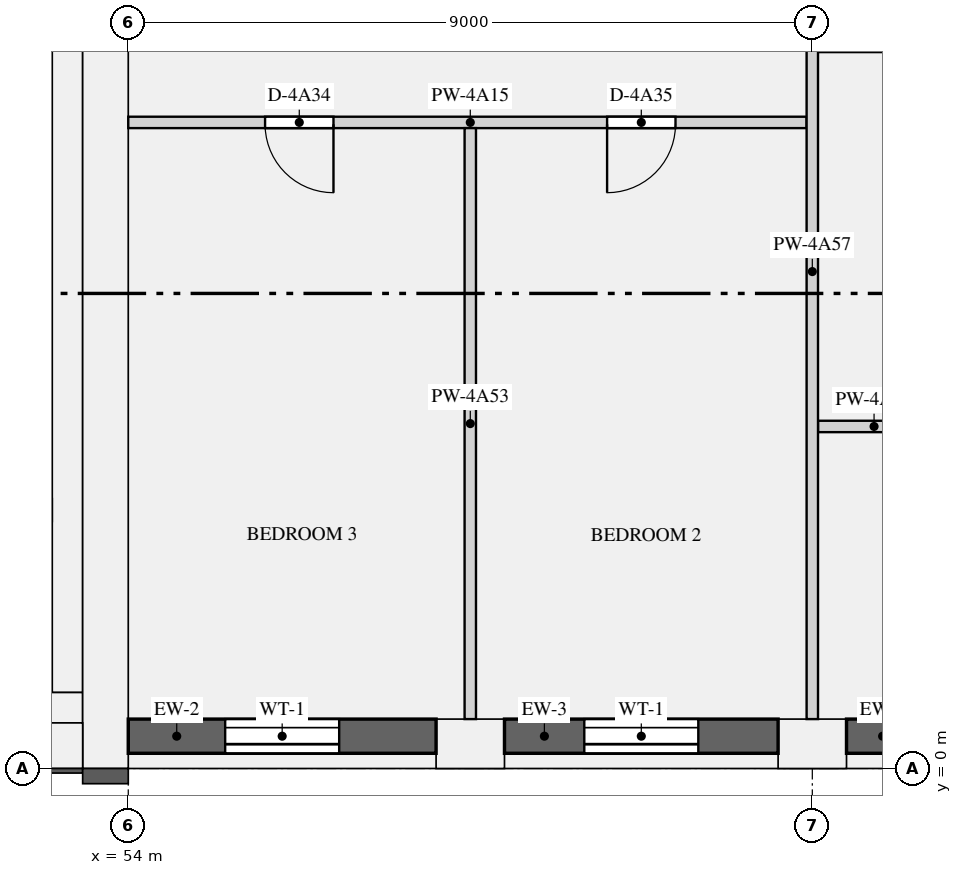
"""IFC4 building model, lengths in metres.
Left out: names, types, materials, properties, quantities, classifications, styles, units other than length and angle.
Written with IfcOpenShell. Run it as: python <this file> out.ifc"""

import sys

from ifc_helpers import new_model, si_unit, direction, frame, frame_2d, origin, origin_2d, place, context, subcontext, project, spatial, rectangle, extrude, element, fill, save


model = new_model("IFC4")
c1 = context("Model", 3, precision=1e-05, world=origin(), true_north=direction((0.0, 1.0)))
c2 = subcontext(c1, "Body", "Model", "MODEL_VIEW")
j1 = project(units=[si_unit("LENGTHUNIT", "METRE"), si_unit("PLANEANGLEUNIT", "RADIAN")], contexts=[c1])
p1 = place(None, origin())
s1 = spatial("IfcSite", under=j1, at=p1, CompositionType="ELEMENT")
p2 = place(p1, origin())
s2 = spatial("IfcBuilding", under=s1, at=p2, CompositionType="ELEMENT")
p3 = place(p2, frame((0.0, 0.0, 198.0)))
s3 = spatial("IfcBuildingStorey", under=s2, at=p3, CompositionType="ELEMENT", Elevation=198.0)
for number, where, z_axis, x_axis in (
    (1, (58.5, 0.325, 0.0), (0.0, 0.0, 1.0), (1.0, 0.0, 0.0)),
    (2, (63.0, 0.325, 0.0), (0.0, 0.0, 1.0), (1.0, 0.0, 0.0)),
):
    element("IfcColumn", number, at=place(p3, frame(where, z_axis=z_axis, x_axis=x_axis)), inside=s3, PredefinedType="USERDEFINED", context=c2, shape_type="SweptSolid", body=[
        extrude(rectangle(XDim=0.9, YDim=0.65, at=origin_2d()), origin(), (0.0, 0.0, 1.0), 3.15),
    ])
p4 = place(p3, frame((53.7, 0.0, 0.0), z_axis=(0.0, 0.0, 1.0), x_axis=(0.0, 1.0, 0.0)))
e3 = element("IfcWall", 3, at=p4, inside=s3, PredefinedType="SHEAR", context=c2, shape_type="SweptSolid", body=[
    extrude(rectangle(XDim=12.5, YDim=0.6, at=frame_2d((6.25, 0.0))), origin(), (0.0, 0.0, 1.0), 3.15),
])
p5 = place(p3, frame((18.6, 0.3, 0.0), z_axis=(0.0, 0.0, 1.0), x_axis=(1.0, 0.0, 0.0)))
e4 = element("IfcWall", 4, at=p5, inside=s3, PredefinedType="SHEAR", context=c2, shape_type="SweptSolid", body=[
    extrude(rectangle(XDim=34.8, YDim=0.6, at=frame_2d((17.4, 0.0))), origin(), (0.0, 0.0, 1.0), 3.15),
])
p6 = place(p3, frame((53.2, 1.0, 0.0), z_axis=(0.0, 0.0, 1.0), x_axis=(0.0, 1.0, 0.0)))
e5 = element("IfcWall", 5, at=p6, inside=s3, PredefinedType="SHEAR", context=c2, shape_type="SweptSolid", body=[
    extrude(rectangle(XDim=10.9, YDim=0.4, at=frame_2d((5.45, 0.0))), origin(), (0.0, 0.0, 1.0), 3.15),
])
p7 = place(p3, frame((18.6, 0.8, 0.0), z_axis=(0.0, 0.0, 1.0), x_axis=(1.0, 0.0, 0.0)))
e6 = element("IfcWall", 6, at=p7, inside=s3, PredefinedType="SHEAR", context=c2, shape_type="SweptSolid", body=[
    extrude(rectangle(XDim=34.8, YDim=0.4, at=frame_2d((17.4, 0.0))), origin(), (0.0, 0.0, 1.0), 3.15),
])
p8 = place(p3, frame((54.0, 0.425, 0.9), z_axis=(0.0, 0.0, 1.0), x_axis=(1.0, 0.0, 0.0)))
e7 = element("IfcWall", 7, at=p8, inside=s3, PredefinedType="SOLIDWALL", context=c2, shape_type="SweptSolid", body=[
    extrude(rectangle(XDim=4.05, YDim=0.45, at=frame_2d((2.025, 0.0))), origin(), (0.0, 0.0, 1.0), 1.93),
])
p9 = place(p8, frame((1.275, 0.0, 0.15)))
e8 = element("IfcOpeningElement", 8, at=p9, cuts=e7, PredefinedType="OPENING", context=c2, shape_type="SweptSolid", body=[
    extrude(rectangle(XDim=1.5, YDim=1.5, at=frame_2d((0.75, 0.75))), frame((0.0, 0.235, 0.0), z_axis=(0.0, -1.0, 0.0), x_axis=(1.0, 0.0, 0.0)), (0.0, 0.0, 1.0), 0.47),
])
p10 = place(p3, frame((58.95, 0.425, 0.9), z_axis=(0.0, 0.0, 1.0), x_axis=(1.0, 0.0, 0.0)))
e9 = element("IfcWall", 9, at=p10, inside=s3, PredefinedType="SOLIDWALL", context=c2, shape_type="SweptSolid", body=[
    extrude(rectangle(XDim=3.6, YDim=0.45, at=frame_2d((1.8, 0.0))), origin(), (0.0, 0.0, 1.0), 1.93),
])
p11 = place(p10, frame((1.05, 0.0, 0.15)))
e10 = element("IfcOpeningElement", 10, at=p11, cuts=e9, PredefinedType="OPENING", context=c2, shape_type="SweptSolid", body=[
    extrude(rectangle(XDim=1.5, YDim=1.5, at=frame_2d((0.75, 0.75))), frame((0.0, 0.235, 0.0), z_axis=(0.0, -1.0, 0.0), x_axis=(1.0, 0.0, 0.0)), (0.0, 0.0, 1.0), 0.47),
])
p12 = place(p3, frame((63.45, 0.425, 0.9), z_axis=(0.0, 0.0, 1.0), x_axis=(1.0, 0.0, 0.0)))
e11 = element("IfcWall", 11, at=p12, inside=s3, PredefinedType="SOLIDWALL", context=c2, shape_type="SweptSolid", body=[
    extrude(rectangle(XDim=3.4, YDim=0.45, at=frame_2d((1.7, 0.0))), origin(), (0.0, 0.0, 1.0), 1.93),
])
p13 = place(p12, frame((0.95, 0.0, 0.15)))
e12 = element("IfcOpeningElement", 12, at=p13, cuts=e11, PredefinedType="OPENING", context=c2, shape_type="SweptSolid", body=[
    extrude(rectangle(XDim=1.5, YDim=1.5, at=frame_2d((0.75, 0.75))), frame((0.0, 0.235, 0.0), z_axis=(0.0, -1.0, 0.0), x_axis=(1.0, 0.0, 0.0)), (0.0, 0.0, 1.0), 0.47),
])
p14 = place(p3, frame((54.0, 8.5, 0.0), z_axis=(0.0, 0.0, 1.0), x_axis=(1.0, 0.0, 0.0)))
e13 = element("IfcWall", 13, at=p14, inside=s3, PredefinedType="PARTITIONING", context=c2, shape_type="SweptSolid", body=[
    extrude(rectangle(XDim=8.925, YDim=0.15, at=frame_2d((4.462, 0.0))), origin(), (0.0, 0.0, 1.0), 2.83),
])
p15 = place(p14, frame((1.8, 0.0, 0.0)))
e14 = element("IfcOpeningElement", 14, at=p15, cuts=e13, PredefinedType="OPENING", context=c2, shape_type="SweptSolid", body=[
    extrude(rectangle(XDim=0.9, YDim=2.1, at=frame_2d((0.45, 1.05))), frame((0.0, 0.085, 0.0), z_axis=(0.0, -1.0, 0.0), x_axis=(1.0, 0.0, 0.0)), (0.0, 0.0, 1.0), 0.17),
])
p16 = place(p14, frame((6.3, 0.0, 0.0)))
e15 = element("IfcOpeningElement", 15, at=p16, cuts=e13, PredefinedType="OPENING", context=c2, shape_type="SweptSolid", body=[
    extrude(rectangle(XDim=0.9, YDim=2.1, at=frame_2d((0.45, 1.05))), frame((0.0, 0.085, 0.0), z_axis=(0.0, -1.0, 0.0), x_axis=(1.0, 0.0, 0.0)), (0.0, 0.0, 1.0), 0.17),
])
p17 = place(p3, frame((63.075, 4.5, 0.0), z_axis=(0.0, 0.0, 1.0), x_axis=(1.0, 0.0, 0.0)))
e16 = element("IfcWall", 16, at=p17, inside=s3, PredefinedType="PARTITIONING", context=c2, shape_type="SweptSolid", body=[
    extrude(rectangle(XDim=3.775, YDim=0.15, at=frame_2d((1.888, 0.0))), origin(), (0.0, 0.0, 1.0), 2.83),
])
p18 = place(p17, frame((1.475, 0.0, 0.0)))
e17 = element("IfcOpeningElement", 17, at=p18, cuts=e16, PredefinedType="OPENING", context=c2, shape_type="SweptSolid", body=[
    extrude(rectangle(XDim=0.9, YDim=2.1, at=frame_2d((0.45, 1.05))), frame((0.0, 0.085, 0.0), z_axis=(0.0, -1.0, 0.0), x_axis=(1.0, 0.0, 0.0)), (0.0, 0.0, 1.0), 0.17),
])
p19 = place(p3, frame((58.5, 0.65, 0.0), z_axis=(0.0, 0.0, 1.0), x_axis=(0.0, 1.0, 0.0)))
e18 = element("IfcWall", 18, at=p19, inside=s3, PredefinedType="PARTITIONING", context=c2, shape_type="SweptSolid", body=[
    extrude(rectangle(XDim=7.775, YDim=0.15, at=frame_2d((3.888, 0.0))), origin(), (0.0, 0.0, 1.0), 2.83),
])
p20 = place(p3, frame((63.0, 0.65, 0.0), z_axis=(0.0, 0.0, 1.0), x_axis=(0.0, 1.0, 0.0)))
e19 = element("IfcWall", 19, at=p20, inside=s3, PredefinedType="PARTITIONING", context=c2, shape_type="SweptSolid", body=[
    extrude(rectangle(XDim=11.775, YDim=0.15, at=frame_2d((5.888, 0.0))), origin(), (0.0, 0.0, 1.0), 2.83),
])
p21 = place(p9, origin())
e20 = element("IfcWindow", 20, at=p21, inside=s3, PartitioningType="SINGLE_PANEL", PredefinedType="WINDOW", context=c2, shape_type="SweptSolid", body=[
    extrude(rectangle(XDim=1.5, YDim=1.5, at=frame_2d((0.75, 0.75))), frame((0.0, -0.065, 0.0), z_axis=(0.0, -1.0, 0.0), x_axis=(1.0, 0.0, 0.0)), (0.0, 0.0, 1.0), 0.06),
])
fill(e8, e20)
p22 = place(p11, origin())
e21 = element("IfcWindow", 21, at=p22, inside=s3, PartitioningType="SINGLE_PANEL", PredefinedType="WINDOW", context=c2, shape_type="SweptSolid", body=[
    extrude(rectangle(XDim=1.5, YDim=1.5, at=frame_2d((0.75, 0.75))), frame((0.0, -0.065, 0.0), z_axis=(0.0, -1.0, 0.0), x_axis=(1.0, 0.0, 0.0)), (0.0, 0.0, 1.0), 0.06),
])
fill(e10, e21)
p23 = place(p15, frame((0.9, 0.0, 0.0), z_axis=(0.0, 0.0, 1.0), x_axis=(-1.0, 0.0, 0.0)))
e22 = element("IfcDoor", 22, at=p23, inside=s3, OperationType="SINGLE_SWING_LEFT", PredefinedType="DOOR", context=c2, shape_type="SweptSolid", body=[
    extrude(rectangle(XDim=0.9, YDim=2.1, at=frame_2d((0.45, 1.05))), frame((0.0, 0.025, 0.0), z_axis=(0.0, -1.0, 0.0), x_axis=(1.0, 0.0, 0.0)), (0.0, 0.0, 1.0), 0.05),
])
fill(e14, e22)
p24 = place(p16, frame((0.9, 0.0, 0.0), z_axis=(0.0, 0.0, 1.0), x_axis=(-1.0, 0.0, 0.0)))
e23 = element("IfcDoor", 23, at=p24, inside=s3, OperationType="SINGLE_SWING_RIGHT", PredefinedType="DOOR", context=c2, shape_type="SweptSolid", body=[
    extrude(rectangle(XDim=0.9, YDim=2.1, at=frame_2d((0.45, 1.05))), frame((0.0, 0.025, 0.0), z_axis=(0.0, -1.0, 0.0), x_axis=(1.0, 0.0, 0.0)), (0.0, 0.0, 1.0), 0.05),
])
fill(e15, e23)
save(model, sys.argv[1])
